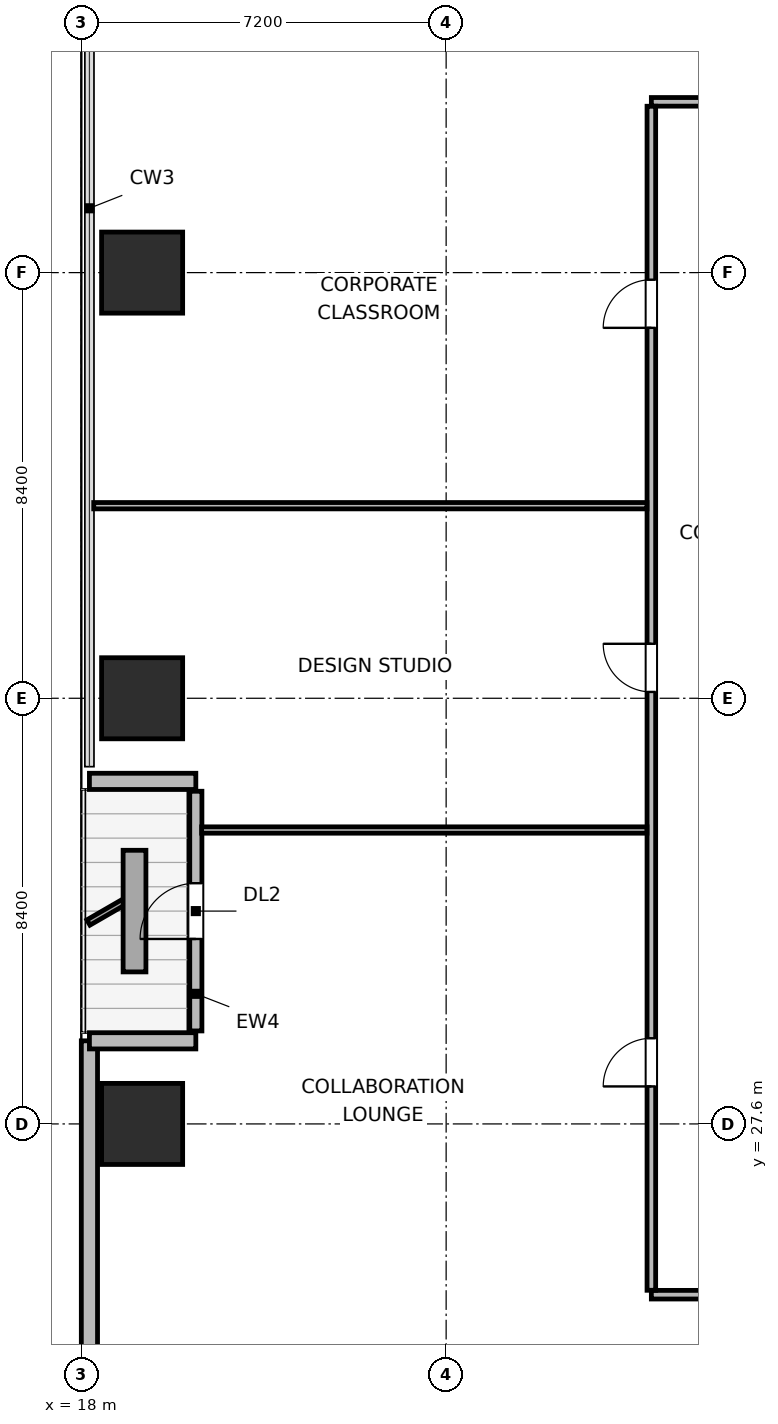
"""IFC4 building model, lengths in metres.
Left out: names, types, materials, properties, quantities, classifications, styles, units other than length and angle.
Written with IfcOpenShell. Run it as: python <this file> out.ifc"""

import sys

from ifc_helpers import new_model, si_unit, direction, frame, frame_2d, origin, origin_2d, place, context, subcontext, project, spatial, rectangle, extrude, element, fill, save


model = new_model("IFC4")
c1 = context("Model", 3, precision=1e-05, world=origin(), true_north=direction((0.0, 1.0)))
c2 = subcontext(c1, "Body", "Model", "MODEL_VIEW")
j1 = project(units=[si_unit("LENGTHUNIT", "METRE"), si_unit("PLANEANGLEUNIT", "RADIAN")], contexts=[c1])
p1 = place(None, origin())
s1 = spatial("IfcSite", under=j1, at=p1, CompositionType="ELEMENT")
p2 = place(p1, origin())
s2 = spatial("IfcBuilding", under=s1, at=p2, CompositionType="ELEMENT")
p3 = place(p2, frame((0.0, 0.0, 89.7)))
s3 = spatial("IfcBuildingStorey", under=s2, at=p3, CompositionType="ELEMENT", Elevation=89.7)
for number, where, z_axis, x_axis in (
    (1, (19.2, 27.6, 0.0), (0.0, 0.0, 1.0), (1.0, 0.0, 0.0)),
    (2, (19.2, 36.0, 0.0), (0.0, 0.0, 1.0), (1.0, 0.0, 0.0)),
    (3, (19.2, 44.4, 0.0), (0.0, 0.0, 1.0), (1.0, 0.0, 0.0)),
):
    element("IfcColumn", number, at=place(p3, frame(where, z_axis=z_axis, x_axis=x_axis)), inside=s3, PredefinedType="COLUMN", context=c2, shape_type="SweptSolid", body=[
        extrude(rectangle(XDim=1.6, YDim=1.6, at=origin_2d()), origin(), (0.0, 0.0, 1.0), 3.9),
    ])
p4 = place(p3, frame((18.16, 15.021, 0.0), z_axis=(0.0, 0.0, 1.0), x_axis=(0.0, 1.0, 0.0)))
e4 = element("IfcWall", 4, at=p4, inside=s3, PredefinedType="SOLIDWALL", context=c2, shape_type="SweptSolid", body=[
    extrude(rectangle(XDim=14.219, YDim=0.32, at=frame_2d((7.109, 0.0))), origin(), (0.0, 0.0, 1.0), 3.64),
])
p5 = place(p3, frame((18.16, 29.24, 0.0), z_axis=(0.0, 0.0, 1.0), x_axis=(1.0, 0.0, 0.0)))
e5 = element("IfcWall", 5, at=p5, inside=s3, PredefinedType="SOLIDWALL", context=c2, shape_type="SweptSolid", body=[
    extrude(rectangle(XDim=2.1, YDim=0.32, at=frame_2d((1.05, 0.0))), origin(), (0.0, 0.0, 1.0), 2.875),
])
p6 = place(p3, frame((20.26, 29.435, 0.0), z_axis=(0.0, 0.0, 1.0), x_axis=(0.0, 1.0, 0.0)))
e6 = element("IfcWall", 6, at=p6, inside=s3, PredefinedType="SOLIDWALL", context=c2, shape_type="SweptSolid", body=[
    extrude(rectangle(XDim=4.73, YDim=0.24, at=frame_2d((2.365, 0.0))), origin(), (0.0, 0.0, 1.0), 3.162),
])
p7 = place(p6, frame((1.815, 0.0, 0.0)))
e7 = element("IfcOpeningElement", 7, at=p7, cuts=e6, PredefinedType="OPENING", context=c2, shape_type="SweptSolid", body=[
    extrude(rectangle(XDim=1.1, YDim=2.04, at=frame_2d((0.55, 1.02))), frame((0.0, 0.13, 0.0), z_axis=(0.0, -1.0, 0.0), x_axis=(1.0, 0.0, 0.0)), (0.0, 0.0, 1.0), 0.26),
])
p8 = place(p3, frame((20.26, 34.36, 0.0), z_axis=(0.0, 0.0, 1.0), x_axis=(-1.0, 0.0, 0.0)))
e8 = element("IfcWall", 8, at=p8, inside=s3, PredefinedType="SOLIDWALL", context=c2, shape_type="SweptSolid", body=[
    extrude(rectangle(XDim=2.1, YDim=0.32, at=frame_2d((1.05, 0.0))), origin(), (0.0, 0.0, 1.0), 2.875),
])
p9 = place(p3, frame((29.25, 24.23, 0.0), z_axis=(0.0, 0.0, 1.0), x_axis=(1.0, 0.0, 0.0)))
e9 = element("IfcWall", 9, at=p9, inside=s3, PredefinedType="PARTITIONING", context=c2, shape_type="SweptSolid", body=[
    extrude(rectangle(XDim=37.5, YDim=0.17, at=frame_2d((18.75, 0.0))), origin(), (0.0, 0.0, 1.0), 3.64),
])
p10 = place(p9, frame((4.51, 0.0, 0.0)))
e10 = element("IfcOpeningElement", 10, at=p10, cuts=e9, PredefinedType="OPENING", context=c2, shape_type="SweptSolid", body=[
    extrude(rectangle(XDim=0.95, YDim=2.04, at=frame_2d((0.475, 1.02))), frame((0.0, 0.095, 0.0), z_axis=(0.0, -1.0, 0.0), x_axis=(1.0, 0.0, 0.0)), (0.0, 0.0, 1.0), 0.19),
])
p11 = place(p9, frame((13.885, 0.0, 0.0)))
e11 = element("IfcOpeningElement", 11, at=p11, cuts=e9, PredefinedType="OPENING", context=c2, shape_type="SweptSolid", body=[
    extrude(rectangle(XDim=0.95, YDim=2.04, at=frame_2d((0.475, 1.02))), frame((0.0, 0.095, 0.0), z_axis=(0.0, -1.0, 0.0), x_axis=(1.0, 0.0, 0.0)), (0.0, 0.0, 1.0), 0.19),
])
p12 = place(p9, frame((22.66, 0.0, 0.0)))
e12 = element("IfcOpeningElement", 12, at=p12, cuts=e9, PredefinedType="OPENING", context=c2, shape_type="SweptSolid", body=[
    extrude(rectangle(XDim=0.95, YDim=2.04, at=frame_2d((0.475, 1.02))), frame((0.0, 0.095, 0.0), z_axis=(0.0, -1.0, 0.0), x_axis=(1.0, 0.0, 0.0)), (0.0, 0.0, 1.0), 0.19),
])
p13 = place(p9, frame((32.035, 0.0, 0.0)))
e13 = element("IfcOpeningElement", 13, at=p13, cuts=e9, PredefinedType="OPENING", context=c2, shape_type="SweptSolid", body=[
    extrude(rectangle(XDim=0.95, YDim=2.04, at=frame_2d((0.475, 1.02))), frame((0.0, 0.095, 0.0), z_axis=(0.0, -1.0, 0.0), x_axis=(1.0, 0.0, 0.0)), (0.0, 0.0, 1.0), 0.19),
])
p14 = place(p3, frame((29.25, 47.77, 0.0), z_axis=(0.0, 0.0, 1.0), x_axis=(1.0, 0.0, 0.0)))
e14 = element("IfcWall", 14, at=p14, inside=s3, PredefinedType="PARTITIONING", context=c2, shape_type="SweptSolid", body=[
    extrude(rectangle(XDim=37.5, YDim=0.17, at=frame_2d((18.75, 0.0))), origin(), (0.0, 0.0, 1.0), 3.64),
])
p15 = place(p14, frame((4.005, 0.0, 0.0)))
e15 = element("IfcOpeningElement", 15, at=p15, cuts=e14, PredefinedType="OPENING", context=c2, shape_type="SweptSolid", body=[
    extrude(rectangle(XDim=0.95, YDim=2.04, at=frame_2d((0.475, 1.02))), frame((0.0, 0.095, 0.0), z_axis=(0.0, -1.0, 0.0), x_axis=(1.0, 0.0, 0.0)), (0.0, 0.0, 1.0), 0.19),
])
p16 = place(p14, frame((10.07, 0.0, 0.0)))
e16 = element("IfcOpeningElement", 16, at=p16, cuts=e14, PredefinedType="OPENING", context=c2, shape_type="SweptSolid", body=[
    extrude(rectangle(XDim=0.95, YDim=2.04, at=frame_2d((0.475, 1.02))), frame((0.0, 0.095, 0.0), z_axis=(0.0, -1.0, 0.0), x_axis=(1.0, 0.0, 0.0)), (0.0, 0.0, 1.0), 0.19),
])
p17 = place(p14, frame((17.165, 0.0, 0.0)))
e17 = element("IfcOpeningElement", 17, at=p17, cuts=e14, PredefinedType="OPENING", context=c2, shape_type="SweptSolid", body=[
    extrude(rectangle(XDim=0.95, YDim=2.04, at=frame_2d((0.475, 1.02))), frame((0.0, 0.095, 0.0), z_axis=(0.0, -1.0, 0.0), x_axis=(1.0, 0.0, 0.0)), (0.0, 0.0, 1.0), 0.19),
])
p18 = place(p14, frame((25.37, 0.0, 0.0)))
e18 = element("IfcOpeningElement", 18, at=p18, cuts=e14, PredefinedType="OPENING", context=c2, shape_type="SweptSolid", body=[
    extrude(rectangle(XDim=0.95, YDim=2.04, at=frame_2d((0.475, 1.02))), frame((0.0, 0.095, 0.0), z_axis=(0.0, -1.0, 0.0), x_axis=(1.0, 0.0, 0.0)), (0.0, 0.0, 1.0), 0.19),
])
p19 = place(p14, frame((32.545, 0.0, 0.0)))
e19 = element("IfcOpeningElement", 19, at=p19, cuts=e14, PredefinedType="OPENING", context=c2, shape_type="SweptSolid", body=[
    extrude(rectangle(XDim=0.95, YDim=2.04, at=frame_2d((0.475, 1.02))), frame((0.0, 0.095, 0.0), z_axis=(0.0, -1.0, 0.0), x_axis=(1.0, 0.0, 0.0)), (0.0, 0.0, 1.0), 0.19),
])
p20 = place(p3, frame((29.25, 24.317, 0.0), z_axis=(0.0, 0.0, 1.0), x_axis=(0.0, 1.0, 0.0)))
e20 = element("IfcWall", 20, at=p20, inside=s3, PredefinedType="PARTITIONING", context=c2, shape_type="SweptSolid", body=[
    extrude(rectangle(XDim=23.366, YDim=0.17, at=frame_2d((11.683, 0.0))), origin(), (0.0, 0.0, 1.0), 3.64),
])
p21 = place(p20, frame((4.023, 0.0, 0.0)))
e21 = element("IfcOpeningElement", 21, at=p21, cuts=e20, PredefinedType="OPENING", context=c2, shape_type="SweptSolid", body=[
    extrude(rectangle(XDim=0.95, YDim=2.04, at=frame_2d((0.475, 1.02))), frame((0.0, 0.095, 0.0), z_axis=(0.0, -1.0, 0.0), x_axis=(1.0, 0.0, 0.0)), (0.0, 0.0, 1.0), 0.19),
])
p22 = place(p20, frame((11.808, 0.0, 0.0)))
e22 = element("IfcOpeningElement", 22, at=p22, cuts=e20, PredefinedType="OPENING", context=c2, shape_type="SweptSolid", body=[
    extrude(rectangle(XDim=0.95, YDim=2.04, at=frame_2d((0.475, 1.02))), frame((0.0, 0.095, 0.0), z_axis=(0.0, -1.0, 0.0), x_axis=(1.0, 0.0, 0.0)), (0.0, 0.0, 1.0), 0.19),
])
p23 = place(p20, frame((18.993, 0.0, 0.0)))
e23 = element("IfcOpeningElement", 23, at=p23, cuts=e20, PredefinedType="OPENING", context=c2, shape_type="SweptSolid", body=[
    extrude(rectangle(XDim=0.95, YDim=2.04, at=frame_2d((0.475, 1.02))), frame((0.0, 0.095, 0.0), z_axis=(0.0, -1.0, 0.0), x_axis=(1.0, 0.0, 0.0)), (0.0, 0.0, 1.0), 0.19),
])
p24 = place(p3, frame((20.375, 33.4, 0.0), z_axis=(0.0, 0.0, 1.0), x_axis=(1.0, 0.0, 0.0)))
e24 = element("IfcWall", 24, at=p24, inside=s3, PredefinedType="PARTITIONING", context=c2, shape_type="SweptSolid", body=[
    extrude(rectangle(XDim=8.788, YDim=0.125, at=frame_2d((4.394, 0.0))), origin(), (0.0, 0.0, 1.0), 3.64),
])
p25 = place(p3, frame((18.245, 39.8, 0.0), z_axis=(0.0, 0.0, 1.0), x_axis=(1.0, 0.0, 0.0)))
e25 = element("IfcWall", 25, at=p25, inside=s3, PredefinedType="PARTITIONING", context=c2, shape_type="SweptSolid", body=[
    extrude(rectangle(XDim=10.918, YDim=0.125, at=frame_2d((5.459, 0.0))), origin(), (0.0, 0.0, 1.0), 3.64),
])
p26 = place(p7, origin())
e26 = element("IfcDoor", 26, at=p26, inside=s3, OperationType="SINGLE_SWING_LEFT", PredefinedType="DOOR", context=c2, shape_type="SweptSolid", body=[
    extrude(rectangle(XDim=1.1, YDim=2.04, at=frame_2d((0.55, 1.02))), frame((0.0, 0.025, 0.0), z_axis=(0.0, -1.0, 0.0), x_axis=(1.0, 0.0, 0.0)), (0.0, 0.0, 1.0), 0.05),
])
fill(e7, e26)
p27 = place(p21, origin())
e27 = element("IfcDoor", 27, at=p27, inside=s3, OperationType="SINGLE_SWING_LEFT", PredefinedType="DOOR", context=c2, shape_type="SweptSolid", body=[
    extrude(rectangle(XDim=0.95, YDim=2.04, at=frame_2d((0.475, 1.02))), frame((0.0, 0.025, 0.0), z_axis=(0.0, -1.0, 0.0), x_axis=(1.0, 0.0, 0.0)), (0.0, 0.0, 1.0), 0.05),
])
fill(e21, e27)
p28 = place(p22, origin())
e28 = element("IfcDoor", 28, at=p28, inside=s3, OperationType="SINGLE_SWING_RIGHT", PredefinedType="DOOR", context=c2, shape_type="SweptSolid", body=[
    extrude(rectangle(XDim=0.95, YDim=2.04, at=frame_2d((0.475, 1.02))), frame((0.0, 0.025, 0.0), z_axis=(0.0, -1.0, 0.0), x_axis=(1.0, 0.0, 0.0)), (0.0, 0.0, 1.0), 0.05),
])
fill(e22, e28)
p29 = place(p23, origin())
e29 = element("IfcDoor", 29, at=p29, inside=s3, OperationType="SINGLE_SWING_LEFT", PredefinedType="DOOR", context=c2, shape_type="SweptSolid", body=[
    extrude(rectangle(XDim=0.95, YDim=2.04, at=frame_2d((0.475, 1.02))), frame((0.0, 0.025, 0.0), z_axis=(0.0, -1.0, 0.0), x_axis=(1.0, 0.0, 0.0)), (0.0, 0.0, 1.0), 0.05),
])
fill(e23, e29)
save(model, sys.argv[1])
